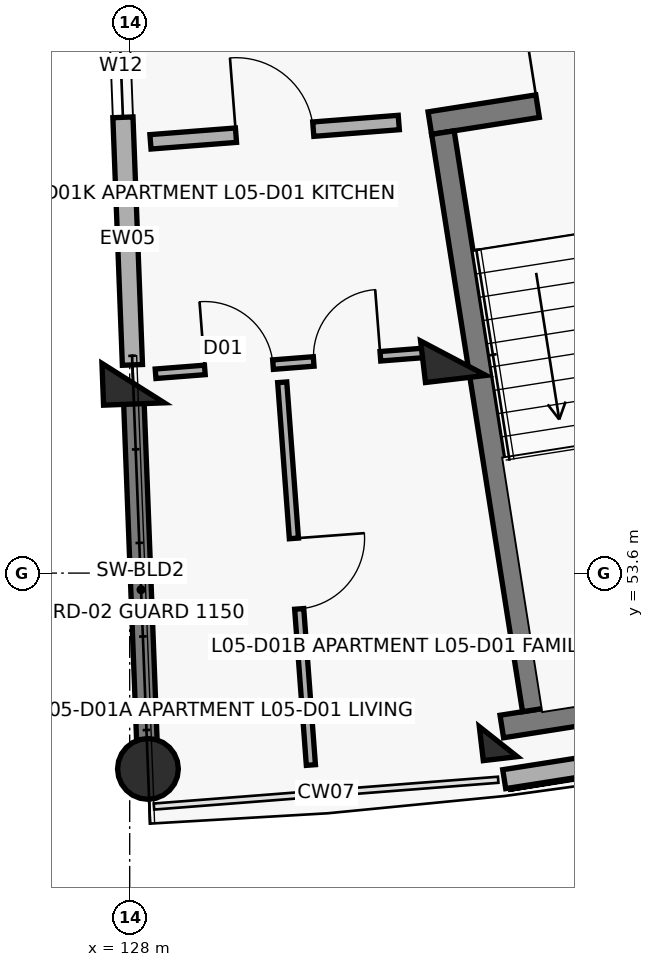
"""IFC4 building model, lengths in metres.
Left out: names, types, materials, properties, quantities, classifications, styles, units other than length and angle.
Written with IfcOpenShell. Run it as: python <this file> out.ifc"""

import sys

from ifc_helpers import new_model, si_unit, direction, frame, frame_2d, origin, origin_2d, place, context, subcontext, project, spatial, rectangle, circle, extrude, element, fill, save


model = new_model("IFC4")
c1 = context("Model", 3, precision=1e-05, world=origin(), true_north=direction((0.0, 1.0)))
c2 = subcontext(c1, "Body", "Model", "MODEL_VIEW")
j1 = project(units=[si_unit("LENGTHUNIT", "METRE"), si_unit("PLANEANGLEUNIT", "RADIAN")], contexts=[c1])
p1 = place(None, origin())
s1 = spatial("IfcSite", under=j1, at=p1, CompositionType="ELEMENT")
p2 = place(p1, origin())
s2 = spatial("IfcBuilding", under=s1, at=p2, CompositionType="ELEMENT")
p3 = place(p2, frame((0.0, 0.0, 17.4)))
s3 = spatial("IfcBuildingStorey", under=s2, at=p3, CompositionType="ELEMENT", Elevation=17.4)
p4 = place(p3, frame((128.045, 56.1, 0.0), z_axis=(0.0, 0.0, 1.0), x_axis=(0.038387809088, -0.999262916411, 0.0)))
e1 = element("IfcColumn", 1, at=p4, inside=s3, PredefinedType="COLUMN", context=c2, shape_type="SweptSolid", body=[
    extrude(rectangle(XDim=0.55, YDim=0.8, at=origin_2d()), origin(), (0.0, 0.0, 1.0), 3.1),
])
p5 = place(p3, frame((128.24, 51.023, 0.0), z_axis=(0.0, 0.0, 1.0), x_axis=(0.038387809088, -0.999262916411, 0.0)))
e2 = element("IfcColumn", 2, at=p5, inside=s3, PredefinedType="COLUMN", context=c2, shape_type="SweptSolid", body=[
    extrude(circle(Radius=0.4, at=origin_2d()), origin(), (0.0, 0.0, 1.0), 3.1),
])
p6 = place(p3, frame((132.257, 56.427, 0.0), z_axis=(0.0, 0.0, 1.0), x_axis=(0.116670737099, -0.993170649538, 0.0)))
e3 = element("IfcColumn", 3, at=p6, inside=s3, PredefinedType="COLUMN", context=c2, shape_type="SweptSolid", body=[
    extrude(rectangle(XDim=0.55, YDim=0.8, at=origin_2d()), origin(), (0.0, 0.0, 1.0), 3.1),
])
p7 = place(p3, frame((132.85, 51.382, 0.0), z_axis=(0.0, 0.0, 1.0), x_axis=(0.116670737099, -0.993170649538, 0.0)))
e4 = element("IfcColumn", 4, at=p7, inside=s3, PredefinedType="COLUMN", context=c2, shape_type="SweptSolid", body=[
    extrude(rectangle(XDim=0.45, YDim=0.45, at=origin_2d()), origin(), (0.0, 0.0, 1.0), 3.1),
])
p8 = place(p3, frame((128.052, 55.92, 0.0), z_axis=(0.0, 0.0, 1.0), x_axis=(0.038381471406, -0.99926315986, 0.0)))
e5 = element("IfcWall", 5, at=p8, inside=s3, PredefinedType="SHEAR", context=c2, shape_type="SweptSolid", body=[
    extrude(rectangle(XDim=4.72, YDim=0.27, at=frame_2d((2.36, 0.0))), origin(), (0.0, 0.0, 1.0), 2.86),
])
p9 = place(p3, frame((132.928, 50.889, 0.0), z_axis=(0.0, 0.0, 1.0), x_axis=(0.987828826394, 0.155544880165, 0.0)))
e6 = element("IfcWall", 6, at=p9, inside=s3, PredefinedType="SOLIDWALL", context=c2, shape_type="SweptSolid", body=[
    extrude(rectangle(XDim=4.622, YDim=0.252, at=frame_2d((2.311, 0.0))), origin(), (0.0, 0.0, 1.0), 2.25),
])
p10 = place(p3, frame((127.721, 64.533, 0.0), z_axis=(0.0, 0.0, 1.0), x_axis=(0.038407966241, -0.999262141847, 0.0)))
e7 = element("IfcWall", 7, at=p10, inside=s3, PredefinedType="SOLIDWALL", context=c2, shape_type="SweptSolid", body=[
    extrude(rectangle(XDim=8.2, YDim=0.265, at=frame_2d((4.1, 0.0))), origin(), (0.0, 0.0, 1.0), 2.18),
])
p11 = place(p10, frame((3.59, 0.0, 0.75)))
e8 = element("IfcOpeningElement", 8, at=p11, cuts=e7, PredefinedType="OPENING", context=c2, shape_type="SweptSolid", body=[
    extrude(rectangle(XDim=1.35, YDim=1.35, at=frame_2d((0.675, 0.675))), frame((0.0, 0.142, 0.0), z_axis=(0.0, -1.0, 0.0), x_axis=(1.0, 0.0, 0.0)), (0.0, 0.0, 1.0), 0.285),
])
p12 = place(p3, frame((131.949, 59.521, 0.0), z_axis=(0.0, 0.0, 1.0), x_axis=(0.98782579805, 0.155564111245, 0.0)))
e9 = element("IfcWall", 9, at=p12, inside=s3, PredefinedType="SHEAR", context=c2, shape_type="SweptSolid", body=[
    extrude(rectangle(XDim=3.87, YDim=0.3, at=frame_2d((1.935, 0.0))), origin(), (0.0, 0.0, 1.0), 3.1),
])
p13 = place(p12, frame((1.435, 0.0, 0.0)))
e10 = element("IfcOpeningElement", 10, at=p13, cuts=e9, PredefinedType="OPENING", context=c2, shape_type="SweptSolid", body=[
    extrude(rectangle(XDim=1.0, YDim=2.15, at=frame_2d((0.5, 1.075))), frame((0.0, 0.16, 0.0), z_axis=(0.0, -1.0, 0.0), x_axis=(1.0, 0.0, 0.0)), (0.0, 0.0, 1.0), 0.32),
])
p14 = place(p3, frame((132.896, 51.581, 0.0), z_axis=(0.0, 0.0, 1.0), x_axis=(0.987819142769, 0.155606366126, 0.0)))
e11 = element("IfcWall", 11, at=p14, inside=s3, PredefinedType="SHEAR", context=c2, shape_type="SweptSolid", body=[
    extrude(rectangle(XDim=4.47, YDim=0.3, at=frame_2d((2.235, 0.0))), origin(), (0.0, 0.0, 1.0), 3.1),
])
p15 = place(p3, frame((132.121, 59.396, 0.0), z_axis=(0.0, 0.0, 1.0), x_axis=(0.155563141844, -0.987825950712, 0.0)))
e12 = element("IfcWall", 12, at=p15, inside=s3, PredefinedType="SHEAR", context=c2, shape_type="SweptSolid", body=[
    extrude(rectangle(XDim=7.69, YDim=0.3, at=frame_2d((3.845, 0.0))), origin(), (0.0, 0.0, 1.0), 3.1),
])
p16 = place(p3, frame((128.273, 59.274, 0.0), z_axis=(0.0, 0.0, 1.0), x_axis=(0.996982624396, 0.077625038827, 0.0)))
e13 = element("IfcWall", 13, at=p16, inside=s3, PredefinedType="SOLIDWALL", context=c2, shape_type="SweptSolid", body=[
    extrude(rectangle(XDim=3.277, YDim=0.19, at=frame_2d((1.639, 0.0))), origin(), (0.0, 0.0, 1.0), 2.08),
])
p17 = place(p16, frame((1.128, 0.0, 0.0)))
e14 = element("IfcOpeningElement", 14, at=p17, cuts=e13, PredefinedType="OPENING", context=c2, shape_type="SweptSolid", body=[
    extrude(rectangle(XDim=1.02, YDim=2.15, at=frame_2d((0.51, 1.075))), frame((0.0, 0.105, 0.0), z_axis=(0.0, -1.0, 0.0), x_axis=(1.0, 0.0, 0.0)), (0.0, 0.0, 1.0), 0.21),
])
p18 = place(p3, frame((128.341, 56.223, 0.0), z_axis=(0.0, 0.0, 1.0), x_axis=(0.996986990942, 0.077568936389, 0.0)))
e15 = element("IfcWall", 15, at=p18, inside=s3, PredefinedType="PARTITIONING", context=c2, shape_type="SweptSolid", body=[
    extrude(rectangle(XDim=3.616, YDim=0.125, at=frame_2d((1.808, 0.0))), origin(), (0.0, 0.0, 1.0), 2.08),
])
p19 = place(p18, frame((0.65, 0.0, 0.0)))
e16 = element("IfcOpeningElement", 16, at=p19, cuts=e15, PredefinedType="OPENING", context=c2, shape_type="SweptSolid", body=[
    extrude(rectangle(XDim=0.9, YDim=2.1, at=frame_2d((0.45, 1.05))), frame((0.0, 0.073, 0.0), z_axis=(0.0, -1.0, 0.0), x_axis=(1.0, 0.0, 0.0)), (0.0, 0.0, 1.0), 0.145),
])
p20 = place(p18, frame((2.086, 0.0, 0.0)))
e17 = element("IfcOpeningElement", 17, at=p20, cuts=e15, PredefinedType="OPENING", context=c2, shape_type="SweptSolid", body=[
    extrude(rectangle(XDim=0.88, YDim=2.1, at=frame_2d((0.44, 1.05))), frame((0.0, 0.073, 0.0), z_axis=(0.0, -1.0, 0.0), x_axis=(1.0, 0.0, 0.0)), (0.0, 0.0, 1.0), 0.145),
])
p21 = place(p3, frame((130.007, 56.111, 0.0), z_axis=(0.0, 0.0, 1.0), x_axis=(0.074692597417, -0.997206606422, 0.0)))
e18 = element("IfcWall", 18, at=p21, inside=s3, PredefinedType="PARTITIONING", context=c2, shape_type="SweptSolid", body=[
    extrude(rectangle(XDim=5.05, YDim=0.12, at=frame_2d((2.525, 0.0))), origin(), (0.0, 0.0, 1.0), 2.08),
])
p22 = place(p21, frame((2.06, 0.0, 0.0)))
e19 = element("IfcOpeningElement", 19, at=p22, cuts=e18, PredefinedType="OPENING", context=c2, shape_type="SweptSolid", body=[
    extrude(rectangle(XDim=0.93, YDim=2.1, at=frame_2d((0.465, 1.05))), frame((0.0, 0.07, 0.0), z_axis=(0.0, -1.0, 0.0), x_axis=(1.0, 0.0, 0.0)), (0.0, 0.0, 1.0), 0.14),
])
p23 = place(p11, origin())
e20 = element("IfcWindow", 20, at=p23, inside=s3, PartitioningType="DOUBLE_PANEL_VERTICAL", PredefinedType="WINDOW", context=c2, shape_type="SweptSolid", body=[
    extrude(rectangle(XDim=1.35, YDim=1.35, at=frame_2d((0.675, 0.675))), frame((0.0, 0.03, 0.0), z_axis=(0.0, -1.0, 0.0), x_axis=(1.0, 0.0, 0.0)), (0.0, 0.0, 1.0), 0.06),
])
fill(e8, e20)
p24 = place(p13, origin())
e21 = element("IfcDoor", 21, at=p24, inside=s3, OperationType="SINGLE_SWING_LEFT", PredefinedType="DOOR", context=c2, shape_type="SweptSolid", body=[
    extrude(rectangle(XDim=1.0, YDim=2.15, at=frame_2d((0.5, 1.075))), frame((0.0, 0.025, 0.0), z_axis=(0.0, -1.0, 0.0), x_axis=(1.0, 0.0, 0.0)), (0.0, 0.0, 1.0), 0.05),
])
fill(e10, e21)
p25 = place(p17, origin())
e22 = element("IfcDoor", 22, at=p25, inside=s3, OperationType="SINGLE_SWING_LEFT", PredefinedType="DOOR", context=c2, shape_type="SweptSolid", body=[
    extrude(rectangle(XDim=1.02, YDim=2.15, at=frame_2d((0.51, 1.075))), frame((0.0, 0.025, 0.0), z_axis=(0.0, -1.0, 0.0), x_axis=(1.0, 0.0, 0.0)), (0.0, 0.0, 1.0), 0.05),
])
fill(e14, e22)
p26 = place(p19, origin())
e23 = element("IfcDoor", 23, at=p26, inside=s3, OperationType="SINGLE_SWING_LEFT", PredefinedType="DOOR", context=c2, shape_type="SweptSolid", body=[
    extrude(rectangle(XDim=0.9, YDim=2.1, at=frame_2d((0.45, 1.05))), frame((0.0, 0.025, 0.0), z_axis=(0.0, -1.0, 0.0), x_axis=(1.0, 0.0, 0.0)), (0.0, 0.0, 1.0), 0.05),
])
fill(e16, e23)
p27 = place(p20, origin())
e24 = element("IfcDoor", 24, at=p27, inside=s3, OperationType="SINGLE_SWING_RIGHT", PredefinedType="DOOR", context=c2, shape_type="SweptSolid", body=[
    extrude(rectangle(XDim=0.88, YDim=2.1, at=frame_2d((0.44, 1.05))), frame((0.0, 0.025, 0.0), z_axis=(0.0, -1.0, 0.0), x_axis=(1.0, 0.0, 0.0)), (0.0, 0.0, 1.0), 0.05),
])
fill(e17, e24)
p28 = place(p22, origin())
e25 = element("IfcDoor", 25, at=p28, inside=s3, OperationType="SINGLE_SWING_LEFT", PredefinedType="DOOR", context=c2, shape_type="SweptSolid", body=[
    extrude(rectangle(XDim=0.93, YDim=2.1, at=frame_2d((0.465, 1.05))), frame((0.0, 0.025, 0.0), z_axis=(0.0, -1.0, 0.0), x_axis=(1.0, 0.0, 0.0)), (0.0, 0.0, 1.0), 0.05),
])
fill(e19, e25)
save(model, sys.argv[1])
